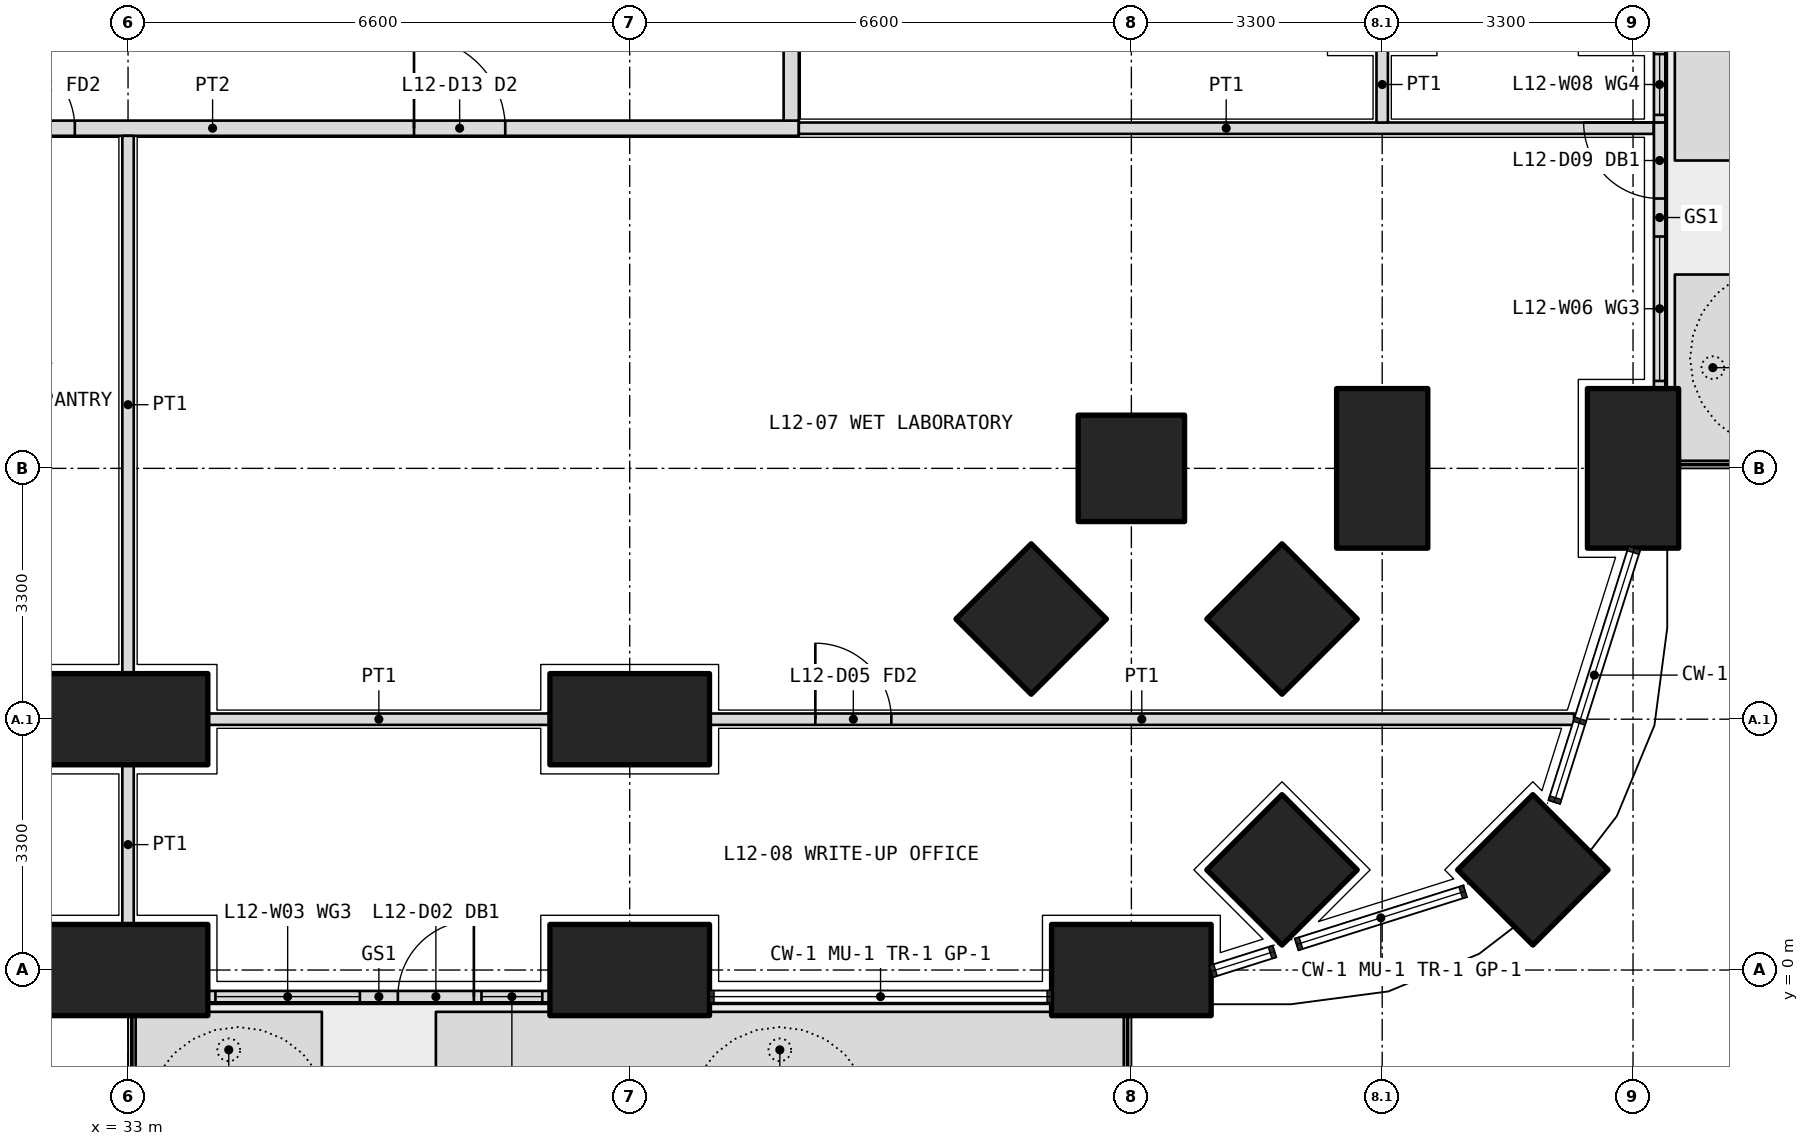
"""IFC4 building model, lengths in metres.
Left out: names, types, materials, properties, quantities, classifications, styles, units other than length and angle.
Written with IfcOpenShell. Run it as: python <this file> out.ifc"""

import sys

from ifc_helpers import new_model, si_unit, direction, frame, frame_2d, origin, origin_2d, place, context, subcontext, project, spatial, polyline, rectangle, outline, extrude, element, fill, save


model = new_model("IFC4")
c1 = context("Model", 3, precision=1e-05, world=origin(), true_north=direction((0.0, 1.0)))
c2 = subcontext(c1, "Body", "Model", "MODEL_VIEW")
j1 = project(units=[si_unit("LENGTHUNIT", "METRE"), si_unit("PLANEANGLEUNIT", "RADIAN")], contexts=[c1])
p1 = place(None, origin())
s1 = spatial("IfcSite", under=j1, at=p1, CompositionType="ELEMENT")
p2 = place(p1, origin())
s2 = spatial("IfcBuilding", under=s1, at=p2, CompositionType="ELEMENT")
p3 = place(p2, frame((0.0, 0.0, 54.9)))
s3 = spatial("IfcBuildingStorey", under=s2, at=p3, CompositionType="ELEMENT", Elevation=54.9)
p4 = place(p3, frame((51.482, 1.318, 0.0), z_axis=(0.0, 0.0, 1.0), x_axis=(0.707106781187, 0.707106781187, 0.0)))
e1 = element("IfcColumn", 1, at=p4, inside=s3, PredefinedType="COLUMN", context=c2, shape_type="SweptSolid", body=[
    extrude(rectangle(XDim=1.4, YDim=1.4, at=origin_2d()), origin(), (0.0, 0.0, 1.0), 4.2),
])
for number, where, z_axis, x_axis in (
    (2, (33.0, 0.0, 0.0), (0.0, 0.0, 1.0), (1.0, 0.0, 0.0)),
    (3, (39.6, 0.0, 0.0), (0.0, 0.0, 1.0), (1.0, 0.0, 0.0)),
    (4, (46.2, 0.0, 0.0), (0.0, 0.0, 1.0), (1.0, 0.0, 0.0)),
    (5, (52.8, 6.6, 0.0), (0.0, 0.0, 1.0), (0.0, 1.0, 0.0)),
):
    element("IfcColumn", number, at=place(p3, frame(where, z_axis=z_axis, x_axis=x_axis)), inside=s3, PredefinedType="COLUMN", context=c2, shape_type="SweptSolid", body=[
        extrude(rectangle(XDim=2.1, YDim=1.2, at=origin_2d()), origin(), (0.0, 0.0, 1.0), 4.2),
    ])
for number, where, z_axis, x_axis in (
    (6, (46.2, 6.6, 0.0), (0.0, 0.0, 1.0), (1.0, 0.0, 0.0)),
    (7, (48.182, 1.318, 0.0), (0.0, 0.0, 1.0), (0.707, 0.707, 0.0)),
):
    element("IfcColumn", number, at=place(p3, frame(where, z_axis=z_axis, x_axis=x_axis)), inside=s3, PredefinedType="COLUMN", context=c2, shape_type="SweptSolid", body=[
        extrude(rectangle(XDim=1.4, YDim=1.4, at=origin_2d()), origin(), (0.0, 0.0, 1.0), 4.2),
    ])
p5 = place(p3, frame((49.5, 6.6, 0.0), z_axis=(0.0, 0.0, 1.0), x_axis=(0.0, 1.0, 0.0)))
e8 = element("IfcColumn", 8, at=p5, inside=s3, PredefinedType="COLUMN", context=c2, shape_type="SweptSolid", body=[
    extrude(rectangle(XDim=2.1, YDim=1.2, at=origin_2d()), origin(), (0.0, 0.0, 1.0), 4.2),
])
p6 = place(p3, frame((48.182, 4.618, 0.0), z_axis=(0.0, 0.0, 1.0), x_axis=(0.707106781187, 0.707106781187, 0.0)))
e9 = element("IfcColumn", 9, at=p6, inside=s3, PredefinedType="COLUMN", context=c2, shape_type="SweptSolid", body=[
    extrude(rectangle(XDim=1.4, YDim=1.4, at=origin_2d()), origin(), (0.0, 0.0, 1.0), 4.2),
])
for number, where, z_axis, x_axis in (
    (10, (33.0, 3.3, 0.0), (0.0, 0.0, 1.0), (1.0, 0.0, 0.0)),
    (11, (39.6, 3.3, 0.0), (0.0, 0.0, 1.0), (1.0, 0.0, 0.0)),
):
    element("IfcColumn", number, at=place(p3, frame(where, z_axis=z_axis, x_axis=x_axis)), inside=s3, PredefinedType="COLUMN", context=c2, shape_type="SweptSolid", body=[
        extrude(rectangle(XDim=2.1, YDim=1.2, at=origin_2d()), origin(), (0.0, 0.0, 1.0), 4.2),
    ])
p7 = place(p3, frame((44.882, 4.618, 0.0), z_axis=(0.0, 0.0, 1.0), x_axis=(0.707106781187, 0.707106781187, 0.0)))
e12 = element("IfcColumn", 12, at=p7, inside=s3, PredefinedType="COLUMN", context=c2, shape_type="SweptSolid", body=[
    extrude(rectangle(XDim=1.4, YDim=1.4, at=origin_2d()), origin(), (0.0, 0.0, 1.0), 4.2),
])
p8 = place(p3, origin())
e13 = element("IfcWall", 13, at=p8, inside=s3, PredefinedType="USERDEFINED", context=c2, shape_type="SweptSolid", body=[
    extrude(outline(polyline([(33.1, -1.55), (35.55, -1.55), (35.55, -0.55), (33.1, -0.55), (33.1, -1.55)]), holes=[polyline([(33.25, -1.4), (35.4, -1.4), (35.4, -0.7), (33.25, -0.7), (33.25, -1.4)])]), origin(), (0.0, 0.0, 1.0), 1.05),
])
p9 = place(p3, origin())
e14 = element("IfcWall", 14, at=p9, inside=s3, PredefinedType="USERDEFINED", context=c2, shape_type="SweptSolid", body=[
    extrude(outline(polyline([(37.05, -1.55), (46.1, -1.55), (46.1, -0.55), (37.05, -0.55), (37.05, -1.55)]), holes=[polyline([(37.2, -1.4), (45.95, -1.4), (45.95, -0.7), (37.2, -0.7), (37.2, -1.4)])]), origin(), (0.0, 0.0, 1.0), 1.05),
])
p10 = place(p3, origin())
e15 = element("IfcWall", 15, at=p10, inside=s3, PredefinedType="USERDEFINED", context=c2, shape_type="SweptSolid", body=[
    extrude(outline(polyline([(53.35, 6.7), (54.35, 6.7), (54.35, 9.15), (53.35, 9.15), (53.35, 6.7)]), holes=[polyline([(53.5, 6.85), (54.2, 6.85), (54.2, 9.0), (53.5, 9.0), (53.5, 6.85)])]), origin(), (0.0, 0.0, 1.0), 1.05),
])
p11 = place(p3, origin())
e16 = element("IfcWall", 16, at=p11, inside=s3, PredefinedType="USERDEFINED", context=c2, shape_type="SweptSolid", body=[
    extrude(outline(polyline([(53.35, 10.65), (54.35, 10.65), (54.35, 19.7), (53.35, 19.7), (53.35, 10.65)]), holes=[polyline([(53.5, 10.8), (54.2, 10.8), (54.2, 19.55), (53.5, 19.55), (53.5, 10.8)])]), origin(), (0.0, 0.0, 1.0), 1.05),
])
p12 = place(p3, frame((34.05, -0.35, 0.0), z_axis=(0.0, 0.0, 1.0), x_axis=(1.0, 0.0, 0.0)))
e17 = element("IfcWall", 17, at=p12, inside=s3, PredefinedType="SOLIDWALL", context=c2, shape_type="SweptSolid", body=[
    extrude(rectangle(XDim=4.5, YDim=0.15, at=frame_2d((2.25, 0.0))), origin(), (0.0, 0.0, 1.0), 2.7),
])
p13 = place(p12, frame((2.5, 0.0, 0.0)))
e18 = element("IfcOpeningElement", 18, at=p13, cuts=e17, PredefinedType="OPENING", context=c2, shape_type="SweptSolid", body=[
    extrude(rectangle(XDim=1.0, YDim=2.4, at=frame_2d((0.5, 1.2))), frame((0.0, 0.085, 0.0), z_axis=(0.0, -1.0, 0.0), x_axis=(1.0, 0.0, 0.0)), (0.0, 0.0, 1.0), 0.17),
])
p14 = place(p12, frame((0.1, 0.0, 0.1)))
e19 = element("IfcOpeningElement", 19, at=p14, cuts=e17, PredefinedType="OPENING", context=c2, shape_type="SweptSolid", body=[
    extrude(rectangle(XDim=1.9, YDim=2.3, at=frame_2d((0.95, 1.15))), frame((0.0, 0.085, 0.0), z_axis=(0.0, -1.0, 0.0), x_axis=(1.0, 0.0, 0.0)), (0.0, 0.0, 1.0), 0.17),
])
p15 = place(p12, frame((3.6, 0.0, 0.1)))
e20 = element("IfcOpeningElement", 20, at=p15, cuts=e17, PredefinedType="OPENING", context=c2, shape_type="SweptSolid", body=[
    extrude(rectangle(XDim=0.8, YDim=2.3, at=frame_2d((0.4, 1.15))), frame((0.0, 0.085, 0.0), z_axis=(0.0, -1.0, 0.0), x_axis=(1.0, 0.0, 0.0)), (0.0, 0.0, 1.0), 0.17),
])
p16 = place(p3, frame((53.15, 7.65, 0.0), z_axis=(0.0, 0.0, 1.0), x_axis=(0.0, 1.0, 0.0)))
e21 = element("IfcWall", 21, at=p16, inside=s3, PredefinedType="SOLIDWALL", context=c2, shape_type="SweptSolid", body=[
    extrude(rectangle(XDim=4.5, YDim=0.15, at=frame_2d((2.25, 0.0))), origin(), (0.0, 0.0, 1.0), 2.7),
])
p17 = place(p16, frame((2.5, 0.0, 0.0)))
e22 = element("IfcOpeningElement", 22, at=p17, cuts=e21, PredefinedType="OPENING", context=c2, shape_type="SweptSolid", body=[
    extrude(rectangle(XDim=1.0, YDim=2.4, at=frame_2d((0.5, 1.2))), frame((0.0, 0.085, 0.0), z_axis=(0.0, -1.0, 0.0), x_axis=(1.0, 0.0, 0.0)), (0.0, 0.0, 1.0), 0.17),
])
p18 = place(p16, frame((0.1, 0.0, 0.1)))
e23 = element("IfcOpeningElement", 23, at=p18, cuts=e21, PredefinedType="OPENING", context=c2, shape_type="SweptSolid", body=[
    extrude(rectangle(XDim=1.9, YDim=2.3, at=frame_2d((0.95, 1.15))), frame((0.0, 0.085, 0.0), z_axis=(0.0, -1.0, 0.0), x_axis=(1.0, 0.0, 0.0)), (0.0, 0.0, 1.0), 0.17),
])
p19 = place(p16, frame((3.6, 0.0, 0.1)))
e24 = element("IfcOpeningElement", 24, at=p19, cuts=e21, PredefinedType="OPENING", context=c2, shape_type="SweptSolid", body=[
    extrude(rectangle(XDim=0.8, YDim=2.3, at=frame_2d((0.4, 1.15))), frame((0.0, 0.085, 0.0), z_axis=(0.0, -1.0, 0.0), x_axis=(1.0, 0.0, 0.0)), (0.0, 0.0, 1.0), 0.17),
])
p20 = place(p3, frame((26.4, 11.075, 0.0), z_axis=(0.0, 0.0, 1.0), x_axis=(1.0, 0.0, 0.0)))
e25 = element("IfcWall", 25, at=p20, inside=s3, PredefinedType="PARTITIONING", context=c2, shape_type="SweptSolid", body=[
    extrude(rectangle(XDim=15.425, YDim=0.2, at=frame_2d((7.712, 0.0))), origin(), (0.0, 0.0, 1.0), 2.85),
])
p21 = place(p20, frame((1.6, 0.0, 0.0)))
e26 = element("IfcOpeningElement", 26, at=p21, cuts=e25, PredefinedType="OPENING", context=c2, shape_type="SweptSolid", body=[
    extrude(rectangle(XDim=1.0, YDim=2.1, at=frame_2d((0.5, 1.05))), frame((0.0, 0.11, 0.0), z_axis=(0.0, -1.0, 0.0), x_axis=(1.0, 0.0, 0.0)), (0.0, 0.0, 1.0), 0.22),
])
p22 = place(p20, frame((4.9, 0.0, 0.0)))
e27 = element("IfcOpeningElement", 27, at=p22, cuts=e25, PredefinedType="OPENING", context=c2, shape_type="SweptSolid", body=[
    extrude(rectangle(XDim=1.0, YDim=2.1, at=frame_2d((0.5, 1.05))), frame((0.0, 0.11, 0.0), z_axis=(0.0, -1.0, 0.0), x_axis=(1.0, 0.0, 0.0)), (0.0, 0.0, 1.0), 0.22),
])
p23 = place(p20, frame((10.363, 0.0, 0.0)))
e28 = element("IfcOpeningElement", 28, at=p23, cuts=e25, PredefinedType="OPENING", context=c2, shape_type="SweptSolid", body=[
    extrude(rectangle(XDim=1.2, YDim=2.1, at=frame_2d((0.6, 1.05))), frame((0.0, 0.11, 0.0), z_axis=(0.0, -1.0, 0.0), x_axis=(1.0, 0.0, 0.0)), (0.0, 0.0, 1.0), 0.22),
])
p24 = place(p3, frame((41.725, 11.175, 0.0), z_axis=(0.0, 0.0, 1.0), x_axis=(0.0, 1.0, 0.0)))
e29 = element("IfcWall", 29, at=p24, inside=s3, PredefinedType="PARTITIONING", context=c2, shape_type="SweptSolid", body=[
    extrude(rectangle(XDim=23.85, YDim=0.2, at=frame_2d((11.925, 0.0))), origin(), (0.0, 0.0, 1.0), 2.85),
])
p25 = place(p24, frame((2.012, 0.0, 0.0)))
e30 = element("IfcOpeningElement", 30, at=p25, cuts=e29, PredefinedType="OPENING", context=c2, shape_type="SweptSolid", body=[
    extrude(rectangle(XDim=1.2, YDim=2.1, at=frame_2d((0.6, 1.05))), frame((0.0, 0.11, 0.0), z_axis=(0.0, -1.0, 0.0), x_axis=(1.0, 0.0, 0.0)), (0.0, 0.0, 1.0), 0.22),
])
p26 = place(p24, frame((6.475, 0.0, 0.0)))
e31 = element("IfcOpeningElement", 31, at=p26, cuts=e29, PredefinedType="OPENING", context=c2, shape_type="SweptSolid", body=[
    extrude(rectangle(XDim=1.0, YDim=2.1, at=frame_2d((0.5, 1.05))), frame((0.0, 0.11, 0.0), z_axis=(0.0, -1.0, 0.0), x_axis=(1.0, 0.0, 0.0)), (0.0, 0.0, 1.0), 0.22),
])
p27 = place(p24, frame((9.625, 0.0, 0.0)))
e32 = element("IfcOpeningElement", 32, at=p27, cuts=e29, PredefinedType="OPENING", context=c2, shape_type="SweptSolid", body=[
    extrude(rectangle(XDim=1.0, YDim=2.1, at=frame_2d((0.5, 1.05))), frame((0.0, 0.11, 0.0), z_axis=(0.0, -1.0, 0.0), x_axis=(1.0, 0.0, 0.0)), (0.0, 0.0, 1.0), 0.22),
])
p28 = place(p24, frame((12.975, 0.0, 0.0)))
e33 = element("IfcOpeningElement", 33, at=p28, cuts=e29, PredefinedType="OPENING", context=c2, shape_type="SweptSolid", body=[
    extrude(rectangle(XDim=0.9, YDim=2.1, at=frame_2d((0.45, 1.05))), frame((0.0, 0.11, 0.0), z_axis=(0.0, -1.0, 0.0), x_axis=(1.0, 0.0, 0.0)), (0.0, 0.0, 1.0), 0.22),
])
p29 = place(p24, frame((16.375, 0.0, 0.0)))
e34 = element("IfcOpeningElement", 34, at=p29, cuts=e29, PredefinedType="OPENING", context=c2, shape_type="SweptSolid", body=[
    extrude(rectangle(XDim=1.0, YDim=2.1, at=frame_2d((0.5, 1.05))), frame((0.0, 0.11, 0.0), z_axis=(0.0, -1.0, 0.0), x_axis=(1.0, 0.0, 0.0)), (0.0, 0.0, 1.0), 0.22),
])
p30 = place(p24, frame((20.738, 0.0, 0.0)))
e35 = element("IfcOpeningElement", 35, at=p30, cuts=e29, PredefinedType="OPENING", context=c2, shape_type="SweptSolid", body=[
    extrude(rectangle(XDim=1.0, YDim=2.1, at=frame_2d((0.5, 1.05))), frame((0.0, 0.11, 0.0), z_axis=(0.0, -1.0, 0.0), x_axis=(1.0, 0.0, 0.0)), (0.0, 0.0, 1.0), 0.22),
])
p31 = place(p3, frame((53.07, 11.075, 0.0), z_axis=(0.0, 0.0, 1.0), x_axis=(-1.0, 0.0, 0.0)))
e36 = element("IfcWall", 36, at=p31, inside=s3, PredefinedType="PARTITIONING", context=c2, shape_type="SweptSolid", body=[
    extrude(rectangle(XDim=11.245, YDim=0.15, at=frame_2d((5.623, 0.0))), origin(), (0.0, 0.0, 1.0), 2.7),
])
p32 = place(p3, frame((34.05, 3.3, 0.0), z_axis=(0.0, 0.0, 1.0), x_axis=(1.0, 0.0, 0.0)))
e37 = element("IfcWall", 37, at=p32, inside=s3, PredefinedType="PARTITIONING", context=c2, shape_type="SweptSolid", body=[
    extrude(rectangle(XDim=4.5, YDim=0.15, at=frame_2d((2.25, 0.0))), origin(), (0.0, 0.0, 1.0), 3.9),
])
p33 = place(p3, frame((40.65, 3.3, 0.0), z_axis=(0.0, 0.0, 1.0), x_axis=(1.0, 0.0, 0.0)))
e38 = element("IfcWall", 38, at=p33, inside=s3, PredefinedType="PARTITIONING", context=c2, shape_type="SweptSolid", body=[
    extrude(rectangle(XDim=11.374, YDim=0.15, at=frame_2d((5.687, 0.0))), origin(), (0.0, 0.0, 1.0), 2.7),
])
p34 = place(p33, frame((1.392, 0.0, 0.0)))
e39 = element("IfcOpeningElement", 39, at=p34, cuts=e38, PredefinedType="OPENING", context=c2, shape_type="SweptSolid", body=[
    extrude(rectangle(XDim=1.0, YDim=2.1, at=frame_2d((0.5, 1.05))), frame((0.0, 0.085, 0.0), z_axis=(0.0, -1.0, 0.0), x_axis=(1.0, 0.0, 0.0)), (0.0, 0.0, 1.0), 0.17),
])
p35 = place(p3, frame((33.0, 0.6, 0.0), z_axis=(0.0, 0.0, 1.0), x_axis=(0.0, 1.0, 0.0)))
e40 = element("IfcWall", 40, at=p35, inside=s3, PredefinedType="PARTITIONING", context=c2, shape_type="SweptSolid", body=[
    extrude(rectangle(XDim=2.1, YDim=0.15, at=frame_2d((1.05, 0.0))), origin(), (0.0, 0.0, 1.0), 2.85),
])
p36 = place(p3, frame((33.0, 3.9, 0.0), z_axis=(0.0, 0.0, 1.0), x_axis=(0.0, 1.0, 0.0)))
e41 = element("IfcWall", 41, at=p36, inside=s3, PredefinedType="PARTITIONING", context=c2, shape_type="SweptSolid", body=[
    extrude(rectangle(XDim=7.075, YDim=0.15, at=frame_2d((3.538, 0.0))), origin(), (0.0, 0.0, 1.0), 2.85),
])
p37 = place(p3, frame((49.5, 11.15, 0.0), z_axis=(0.0, 0.0, 1.0), x_axis=(0.0, 1.0, 0.0)))
e42 = element("IfcWall", 42, at=p37, inside=s3, PredefinedType="PARTITIONING", context=c2, shape_type="SweptSolid", body=[
    extrude(rectangle(XDim=1.0, YDim=0.15, at=frame_2d((0.5, 0.0))), origin(), (0.0, 0.0, 1.0), 3.9),
])
p38 = place(p13, origin())
e43 = element("IfcDoor", 43, at=p38, inside=s3, OperationType="SINGLE_SWING_RIGHT", PredefinedType="DOOR", context=c2, shape_type="SweptSolid", body=[
    extrude(rectangle(XDim=1.0, YDim=2.4, at=frame_2d((0.5, 1.2))), frame((0.0, 0.025, 0.0), z_axis=(0.0, -1.0, 0.0), x_axis=(1.0, 0.0, 0.0)), (0.0, 0.0, 1.0), 0.05),
])
fill(e18, e43)
p39 = place(p14, origin())
e44 = element("IfcWindow", 44, at=p39, inside=s3, PartitioningType="SINGLE_PANEL", PredefinedType="WINDOW", context=c2, shape_type="SweptSolid", body=[
    extrude(rectangle(XDim=1.9, YDim=2.3, at=frame_2d((0.95, 1.15))), frame((0.0, 0.03, 0.0), z_axis=(0.0, -1.0, 0.0), x_axis=(1.0, 0.0, 0.0)), (0.0, 0.0, 1.0), 0.06),
])
fill(e19, e44)
p40 = place(p15, origin())
e45 = element("IfcWindow", 45, at=p40, inside=s3, PartitioningType="SINGLE_PANEL", PredefinedType="WINDOW", context=c2, shape_type="SweptSolid", body=[
    extrude(rectangle(XDim=0.8, YDim=2.3, at=frame_2d((0.4, 1.15))), frame((0.0, 0.03, 0.0), z_axis=(0.0, -1.0, 0.0), x_axis=(1.0, 0.0, 0.0)), (0.0, 0.0, 1.0), 0.06),
])
fill(e20, e45)
p41 = place(p17, origin())
e46 = element("IfcDoor", 46, at=p41, inside=s3, OperationType="SINGLE_SWING_RIGHT", PredefinedType="DOOR", context=c2, shape_type="SweptSolid", body=[
    extrude(rectangle(XDim=1.0, YDim=2.4, at=frame_2d((0.5, 1.2))), frame((0.0, 0.025, 0.0), z_axis=(0.0, -1.0, 0.0), x_axis=(1.0, 0.0, 0.0)), (0.0, 0.0, 1.0), 0.05),
])
fill(e22, e46)
p42 = place(p18, origin())
e47 = element("IfcWindow", 47, at=p42, inside=s3, PartitioningType="SINGLE_PANEL", PredefinedType="WINDOW", context=c2, shape_type="SweptSolid", body=[
    extrude(rectangle(XDim=1.9, YDim=2.3, at=frame_2d((0.95, 1.15))), frame((0.0, 0.03, 0.0), z_axis=(0.0, -1.0, 0.0), x_axis=(1.0, 0.0, 0.0)), (0.0, 0.0, 1.0), 0.06),
])
fill(e23, e47)
p43 = place(p19, origin())
e48 = element("IfcWindow", 48, at=p43, inside=s3, PartitioningType="SINGLE_PANEL", PredefinedType="WINDOW", context=c2, shape_type="SweptSolid", body=[
    extrude(rectangle(XDim=0.8, YDim=2.3, at=frame_2d((0.4, 1.15))), frame((0.0, 0.03, 0.0), z_axis=(0.0, -1.0, 0.0), x_axis=(1.0, 0.0, 0.0)), (0.0, 0.0, 1.0), 0.06),
])
fill(e24, e48)
p44 = place(p22, origin())
e49 = element("IfcDoor", 49, at=p44, inside=s3, OperationType="SINGLE_SWING_LEFT", PredefinedType="DOOR", context=c2, shape_type="SweptSolid", body=[
    extrude(rectangle(XDim=1.0, YDim=2.1, at=frame_2d((0.5, 1.05))), frame((0.0, 0.025, 0.0), z_axis=(0.0, -1.0, 0.0), x_axis=(1.0, 0.0, 0.0)), (0.0, 0.0, 1.0), 0.05),
])
fill(e27, e49)
p45 = place(p23, origin())
e50 = element("IfcDoor", 50, at=p45, inside=s3, OperationType="DOUBLE_DOOR_SINGLE_SWING", PredefinedType="DOOR", context=c2, shape_type="SweptSolid", body=[
    extrude(rectangle(XDim=1.2, YDim=2.1, at=frame_2d((0.6, 1.05))), frame((0.0, 0.025, 0.0), z_axis=(0.0, -1.0, 0.0), x_axis=(1.0, 0.0, 0.0)), (0.0, 0.0, 1.0), 0.05),
])
fill(e28, e50)
p46 = place(p34, origin())
e51 = element("IfcDoor", 51, at=p46, inside=s3, OperationType="SINGLE_SWING_LEFT", PredefinedType="DOOR", context=c2, shape_type="SweptSolid", body=[
    extrude(rectangle(XDim=1.0, YDim=2.1, at=frame_2d((0.5, 1.05))), frame((0.0, 0.025, 0.0), z_axis=(0.0, -1.0, 0.0), x_axis=(1.0, 0.0, 0.0)), (0.0, 0.0, 1.0), 0.05),
])
fill(e39, e51)
save(model, sys.argv[1])
